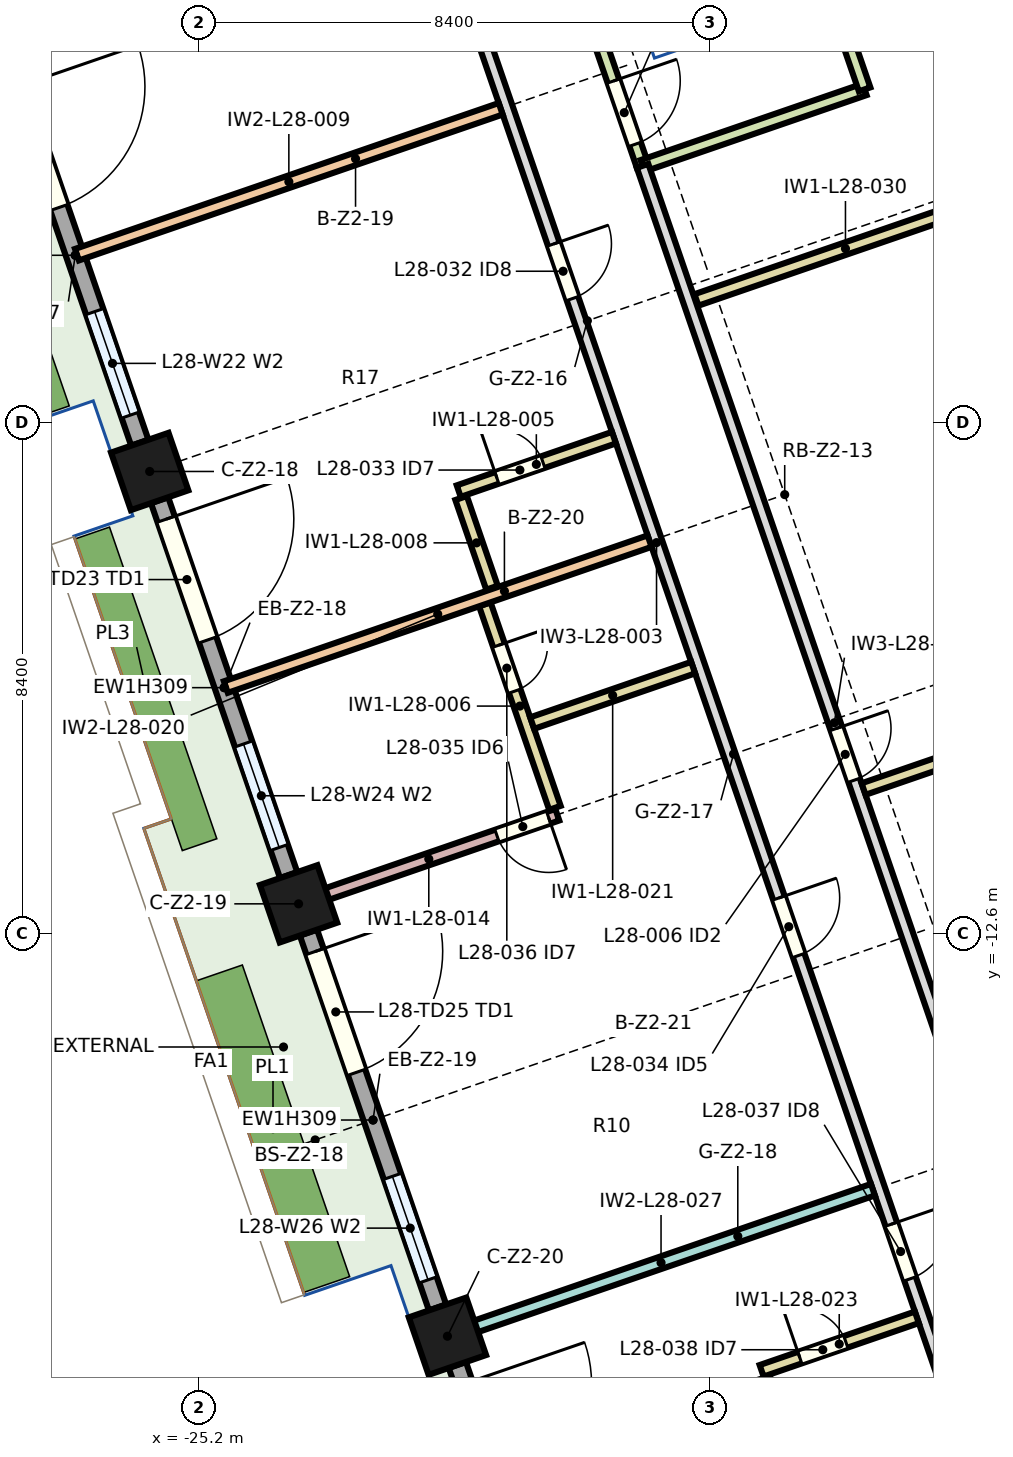
"""IFC4 building model, lengths in metres.
Left out: names, types, materials, properties, quantities, classifications, styles, units other than length and angle.
Written with IfcOpenShell. Run it as: python <this file> out.ifc"""

import sys

from ifc_helpers import new_model, si_unit, direction, frame, frame_2d, origin, origin_2d, place, context, subcontext, project, spatial, rectangle, extrude, element, fill, save


model = new_model("IFC4")
c1 = context("Model", 3, precision=1e-05, world=origin(), true_north=direction((0.0, 1.0)))
c2 = subcontext(c1, "Body", "Model", "MODEL_VIEW")
j1 = project(units=[si_unit("LENGTHUNIT", "METRE"), si_unit("PLANEANGLEUNIT", "RADIAN")], contexts=[c1])
p1 = place(None, origin())
s1 = spatial("IfcSite", under=j1, at=p1, CompositionType="ELEMENT")
p2 = place(p1, origin())
s2 = spatial("IfcBuilding", under=s1, at=p2, CompositionType="ELEMENT")
p3 = place(p2, frame((0.0, 0.0, 134.5)))
s3 = spatial("IfcBuildingStorey", under=s2, at=p3, CompositionType="ELEMENT", Elevation=134.5)
for number, where, z_axis, x_axis in (
    (1, (-25.997, -4.975, 0.0), (0.0, 0.0, 1.0), (0.946, 0.326, 0.0)),
    (2, (-23.548, -12.085, 0.0), (0.0, 0.0, 1.0), (0.946, 0.326, 0.0)),
    (3, (-21.1, -19.195, 0.0), (0.0, 0.0, 1.0), (0.946, 0.326, 0.0)),
):
    element("IfcColumn", number, at=place(p3, frame(where, z_axis=z_axis, x_axis=x_axis)), inside=s3, PredefinedType="COLUMN", context=c2, shape_type="SweptSolid", body=[
        extrude(rectangle(XDim=1.0, YDim=1.0, at=origin_2d()), origin(), (0.0, 0.0, 1.0), 3.55),
    ])
p4 = place(p3, frame((-28.282, 1.663, 0.0), z_axis=(0.0, 0.0, 1.0), x_axis=(0.325580990241, -0.945514155787, 0.0)))
e4 = element("IfcWall", 4, at=p4, inside=s3, PredefinedType="SOLIDWALL", context=c2, shape_type="SweptSolid", body=[
    extrude(rectangle(XDim=6.52, YDim=0.3, at=frame_2d((3.26, 0.0))), origin(), (0.0, 0.0, 1.0), 3.09),
])
p5 = place(p4, frame((0.33, 0.0, 0.0)))
e5 = element("IfcOpeningElement", 5, at=p5, cuts=e4, PredefinedType="OPENING", context=c2, shape_type="SweptSolid", body=[
    extrude(rectangle(XDim=2.1, YDim=2.4, at=frame_2d((1.05, 1.2))), frame((0.0, 0.16, 0.0), z_axis=(0.0, -1.0, 0.0), x_axis=(1.0, 0.0, 0.0)), (0.0, 0.0, 1.0), 0.32),
])
p6 = place(p4, frame((4.24, 0.0, 0.9)))
e6 = element("IfcOpeningElement", 6, at=p6, cuts=e4, PredefinedType="OPENING", context=c2, shape_type="SweptSolid", body=[
    extrude(rectangle(XDim=1.8, YDim=1.5, at=frame_2d((0.9, 0.75))), frame((0.0, 0.16, 0.0), z_axis=(0.0, -1.0, 0.0), x_axis=(1.0, 0.0, 0.0)), (0.0, 0.0, 1.0), 0.32),
])
p7 = place(p3, frame((-25.834, -5.448, 0.0), z_axis=(0.0, 0.0, 1.0), x_axis=(0.325580990241, -0.945514155787, 0.0)))
e7 = element("IfcWall", 7, at=p7, inside=s3, PredefinedType="SOLIDWALL", context=c2, shape_type="SweptSolid", body=[
    extrude(rectangle(XDim=6.52, YDim=0.3, at=frame_2d((3.26, 0.0))), origin(), (0.0, 0.0, 1.0), 3.09),
])
p8 = place(p7, frame((0.33, 0.0, 0.0)))
e8 = element("IfcOpeningElement", 8, at=p8, cuts=e7, PredefinedType="OPENING", context=c2, shape_type="SweptSolid", body=[
    extrude(rectangle(XDim=2.1, YDim=2.4, at=frame_2d((1.05, 1.2))), frame((0.0, 0.16, 0.0), z_axis=(0.0, -1.0, 0.0), x_axis=(1.0, 0.0, 0.0)), (0.0, 0.0, 1.0), 0.32),
])
p9 = place(p7, frame((4.24, 0.0, 0.9)))
e9 = element("IfcOpeningElement", 9, at=p9, cuts=e7, PredefinedType="OPENING", context=c2, shape_type="SweptSolid", body=[
    extrude(rectangle(XDim=1.8, YDim=1.5, at=frame_2d((0.9, 0.75))), frame((0.0, 0.16, 0.0), z_axis=(0.0, -1.0, 0.0), x_axis=(1.0, 0.0, 0.0)), (0.0, 0.0, 1.0), 0.32),
])
p10 = place(p3, frame((-23.386, -12.558, 0.0), z_axis=(0.0, 0.0, 1.0), x_axis=(0.325580990241, -0.945514155787, 0.0)))
e10 = element("IfcWall", 10, at=p10, inside=s3, PredefinedType="SOLIDWALL", context=c2, shape_type="SweptSolid", body=[
    extrude(rectangle(XDim=6.52, YDim=0.3, at=frame_2d((3.26, 0.0))), origin(), (0.0, 0.0, 1.0), 3.09),
])
p11 = place(p10, frame((0.33, 0.0, 0.0)))
e11 = element("IfcOpeningElement", 11, at=p11, cuts=e10, PredefinedType="OPENING", context=c2, shape_type="SweptSolid", body=[
    extrude(rectangle(XDim=2.1, YDim=2.4, at=frame_2d((1.05, 1.2))), frame((0.0, 0.16, 0.0), z_axis=(0.0, -1.0, 0.0), x_axis=(1.0, 0.0, 0.0)), (0.0, 0.0, 1.0), 0.32),
])
p12 = place(p10, frame((4.24, 0.0, 0.9)))
e12 = element("IfcOpeningElement", 12, at=p12, cuts=e10, PredefinedType="OPENING", context=c2, shape_type="SweptSolid", body=[
    extrude(rectangle(XDim=1.8, YDim=1.5, at=frame_2d((0.9, 0.75))), frame((0.0, 0.16, 0.0), z_axis=(0.0, -1.0, 0.0), x_axis=(1.0, 0.0, 0.0)), (0.0, 0.0, 1.0), 0.32),
])
p13 = place(p3, frame((-20.938, -19.668, 0.0), z_axis=(0.0, 0.0, 1.0), x_axis=(0.325592517631, -0.945510186335, 0.0)))
e13 = element("IfcWall", 13, at=p13, inside=s3, PredefinedType="SOLIDWALL", context=c2, shape_type="SweptSolid", body=[
    extrude(rectangle(XDim=6.52, YDim=0.3, at=frame_2d((3.26, 0.0))), origin(), (0.0, 0.0, 1.0), 3.09),
])
p14 = place(p13, frame((0.33, 0.0, 0.0)))
e14 = element("IfcOpeningElement", 14, at=p14, cuts=e13, PredefinedType="OPENING", context=c2, shape_type="SweptSolid", body=[
    extrude(rectangle(XDim=2.1, YDim=2.4, at=frame_2d((1.05, 1.2))), frame((0.0, 0.16, 0.0), z_axis=(0.0, -1.0, 0.0), x_axis=(1.0, 0.0, 0.0)), (0.0, 0.0, 1.0), 0.32),
])
p15 = place(p13, frame((4.24, 0.0, 0.9)))
e15 = element("IfcOpeningElement", 15, at=p15, cuts=e13, PredefinedType="OPENING", context=c2, shape_type="SweptSolid", body=[
    extrude(rectangle(XDim=1.8, YDim=1.5, at=frame_2d((0.9, 0.75))), frame((0.0, 0.16, 0.0), z_axis=(0.0, -1.0, 0.0), x_axis=(1.0, 0.0, 0.0)), (0.0, 0.0, 1.0), 0.32),
])
p16 = place(p3, frame((-22.623, 8.265, 0.0), z_axis=(0.0, 0.0, 1.0), x_axis=(0.325567058058, -0.945518953119, 0.0)))
e16 = element("IfcWall", 16, at=p16, inside=s3, PredefinedType="PARTITIONING", context=c2, shape_type="SweptSolid", body=[
    extrude(rectangle(XDim=30.48, YDim=0.2, at=frame_2d((15.24, 0.0))), origin(), (0.0, 0.0, 1.0), 3.55),
])
p17 = place(p16, frame((4.195, 0.0, 0.0)))
e17 = element("IfcOpeningElement", 17, at=p17, cuts=e16, PredefinedType="OPENING", context=c2, shape_type="SweptSolid", body=[
    extrude(rectangle(XDim=0.95, YDim=2.1, at=frame_2d((0.475, 1.05))), frame((0.0, 0.11, 0.0), z_axis=(0.0, -1.0, 0.0), x_axis=(1.0, 0.0, 0.0)), (0.0, 0.0, 1.0), 0.22),
])
p18 = place(p16, frame((10.045, 0.0, 0.0)))
e18 = element("IfcOpeningElement", 18, at=p18, cuts=e16, PredefinedType="OPENING", context=c2, shape_type="SweptSolid", body=[
    extrude(rectangle(XDim=0.95, YDim=2.1, at=frame_2d((0.475, 1.05))), frame((0.0, 0.11, 0.0), z_axis=(0.0, -1.0, 0.0), x_axis=(1.0, 0.0, 0.0)), (0.0, 0.0, 1.0), 0.22),
])
p19 = place(p16, frame((21.42, 0.0, 0.0)))
e19 = element("IfcOpeningElement", 19, at=p19, cuts=e16, PredefinedType="OPENING", context=c2, shape_type="SweptSolid", body=[
    extrude(rectangle(XDim=1.0, YDim=2.1, at=frame_2d((0.5, 1.05))), frame((0.0, 0.11, 0.0), z_axis=(0.0, -1.0, 0.0), x_axis=(1.0, 0.0, 0.0)), (0.0, 0.0, 1.0), 0.22),
])
p20 = place(p16, frame((27.095, 0.0, 0.0)))
e20 = element("IfcOpeningElement", 20, at=p20, cuts=e16, PredefinedType="OPENING", context=c2, shape_type="SweptSolid", body=[
    extrude(rectangle(XDim=0.95, YDim=2.1, at=frame_2d((0.475, 1.05))), frame((0.0, 0.11, 0.0), z_axis=(0.0, -1.0, 0.0), x_axis=(1.0, 0.0, 0.0)), (0.0, 0.0, 1.0), 0.22),
])
p21 = place(p3, frame((-20.915, -5.298, 0.0), z_axis=(0.0, 0.0, 1.0), x_axis=(0.945508383903, 0.325597751787, 0.0)))
e21 = element("IfcWall", 21, at=p21, inside=s3, PredefinedType="PARTITIONING", context=c2, shape_type="SweptSolid", body=[
    extrude(rectangle(XDim=2.7, YDim=0.2, at=frame_2d((1.35, 0.0))), origin(), (0.0, 0.0, 1.0), 3.55),
])
p22 = place(p21, frame((0.664, 0.0, 0.0)))
e22 = element("IfcOpeningElement", 22, at=p22, cuts=e21, PredefinedType="OPENING", context=c2, shape_type="SweptSolid", body=[
    extrude(rectangle(XDim=0.8, YDim=2.1, at=frame_2d((0.4, 1.05))), frame((0.0, 0.11, 0.0), z_axis=(0.0, -1.0, 0.0), x_axis=(1.0, 0.0, 0.0)), (0.0, 0.0, 1.0), 0.22),
])
p23 = place(p3, frame((-20.485, -7.159, 0.0), z_axis=(0.0, 0.0, 1.0), x_axis=(0.325523047431, -0.945534105991, 0.0)))
e23 = element("IfcWall", 23, at=p23, inside=s3, PredefinedType="PARTITIONING", context=c2, shape_type="SweptSolid", body=[
    extrude(rectangle(XDim=3.54, YDim=0.2, at=frame_2d((1.77, 0.0))), origin(), (0.0, 0.0, 1.0), 3.55),
])
p24 = place(p23, frame((0.71, 0.0, 0.0)))
e24 = element("IfcOpeningElement", 24, at=p24, cuts=e23, PredefinedType="OPENING", context=c2, shape_type="SweptSolid", body=[
    extrude(rectangle(XDim=0.8, YDim=2.1, at=frame_2d((0.4, 1.05))), frame((0.0, 0.11, 0.0), z_axis=(0.0, -1.0, 0.0), x_axis=(1.0, 0.0, 0.0)), (0.0, 0.0, 1.0), 0.22),
])
p25 = place(p3, frame((-20.368, -6.886, 0.0), z_axis=(0.0, 0.0, 1.0), x_axis=(-0.325508352099, 0.945539165087, 0.0)))
e25 = element("IfcWall", 25, at=p25, inside=s3, PredefinedType="PARTITIONING", context=c2, shape_type="SweptSolid", body=[
    extrude(rectangle(XDim=1.56, YDim=0.2, at=frame_2d((0.78, 0.0))), origin(), (0.0, 0.0, 1.0), 3.55),
])
p26 = place(p3, frame((-20.224, 0.99, 0.0), z_axis=(0.0, 0.0, 1.0), x_axis=(-0.945516523202, -0.32557411499, 0.0)))
e26 = element("IfcWall", 26, at=p26, inside=s3, PredefinedType="PARTITIONING", context=c2, shape_type="SweptSolid", body=[
    extrude(rectangle(XDim=7.37, YDim=0.2, at=frame_2d((3.685, 0.0))), origin(), (0.0, 0.0, 1.0), 3.05),
])
p27 = place(p3, frame((-19.845, 5.724, 0.0), z_axis=(0.0, 0.0, 1.0), x_axis=(0.325563034341, -0.945520338581, 0.0)))
e27 = element("IfcWall", 27, at=p27, inside=s3, PredefinedType="SOLIDWALL", context=c2, shape_type="SweptSolid", body=[
    extrude(rectangle(XDim=6.0, YDim=0.2, at=frame_2d((3.0, 0.0))), origin(), (0.0, 0.0, 1.0), 3.55),
])
p28 = place(p27, frame((4.525, 0.0, 0.0)))
e28 = element("IfcOpeningElement", 28, at=p28, cuts=e27, PredefinedType="OPENING", context=c2, shape_type="SweptSolid", body=[
    extrude(rectangle(XDim=1.1, YDim=2.1, at=frame_2d((0.55, 1.05))), frame((0.0, 0.11, 0.0), z_axis=(0.0, -1.0, 0.0), x_axis=(1.0, 0.0, 0.0)), (0.0, 0.0, 1.0), 0.22),
])
p29 = place(p3, frame((-19.294, -10.62, 0.0), z_axis=(0.0, 0.0, 1.0), x_axis=(-0.945529593347, -0.325536154835, 0.0)))
e29 = element("IfcWall", 29, at=p29, inside=s3, PredefinedType="PARTITIONING", context=c2, shape_type="SweptSolid", body=[
    extrude(rectangle(XDim=4.47, YDim=0.2, at=frame_2d((2.235, 0.0))), origin(), (0.0, 0.0, 1.0), 2.65),
])
p30 = place(p29, frame((0.15, 0.0, 0.0)))
e30 = element("IfcOpeningElement", 30, at=p30, cuts=e29, PredefinedType="OPENING", context=c2, shape_type="SweptSolid", body=[
    extrude(rectangle(XDim=0.9, YDim=2.1, at=frame_2d((0.45, 1.05))), frame((0.0, 0.11, 0.0), z_axis=(0.0, -1.0, 0.0), x_axis=(1.0, 0.0, 0.0)), (0.0, 0.0, 1.0), 0.22),
])
p31 = place(p3, frame((-17.892, 0.051, 0.0), z_axis=(0.0, 0.0, 1.0), x_axis=(0.945514621213, 0.325579638603, 0.0)))
e31 = element("IfcWall", 31, at=p31, inside=s3, PredefinedType="SOLIDWALL", context=c2, shape_type="SweptSolid", body=[
    extrude(rectangle(XDim=3.863, YDim=0.2, at=frame_2d((1.931, 0.0))), origin(), (0.0, 0.0, 1.0), 3.55),
])
p32 = place(p3, frame((-17.892, 0.051, 0.0), z_axis=(0.0, 0.0, 1.0), x_axis=(0.325580537834, -0.94551431157, 0.0)))
e32 = element("IfcWall", 32, at=p32, inside=s3, PredefinedType="PARTITIONING", context=c2, shape_type="SweptSolid", body=[
    extrude(rectangle(XDim=19.374, YDim=0.2, at=frame_2d((9.687, 0.0))), origin(), (0.0, 0.0, 1.0), 3.55),
])
p33 = place(p32, frame((9.786, 0.0, 0.0)))
e33 = element("IfcOpeningElement", 33, at=p33, cuts=e32, PredefinedType="OPENING", context=c2, shape_type="SweptSolid", body=[
    extrude(rectangle(XDim=0.9, YDim=2.1, at=frame_2d((0.45, 1.05))), frame((0.0, 0.11, 0.0), z_axis=(0.0, -1.0, 0.0), x_axis=(1.0, 0.0, 0.0)), (0.0, 0.0, 1.0), 0.22),
])
p34 = place(p3, frame((-17.776, -6.121, 0.0), z_axis=(0.0, 0.0, 1.0), x_axis=(-0.945520034471, -0.325563917555, 0.0)))
e34 = element("IfcWall", 34, at=p34, inside=s3, PredefinedType="PARTITIONING", context=c2, shape_type="SweptSolid", body=[
    extrude(rectangle(XDim=7.37, YDim=0.2, at=frame_2d((3.685, 0.0))), origin(), (0.0, 0.0, 1.0), 3.05),
])
p35 = place(p3, frame((-17.06, -8.201, 0.0), z_axis=(0.0, 0.0, 1.0), x_axis=(-0.945515586558, -0.325576835135, 0.0)))
e35 = element("IfcWall", 35, at=p35, inside=s3, PredefinedType="PARTITIONING", context=c2, shape_type="SweptSolid", body=[
    extrude(rectangle(XDim=2.8, YDim=0.2, at=frame_2d((1.4, 0.0))), origin(), (0.0, 0.0, 1.0), 3.55),
])
p36 = place(p3, frame((-15.934, -19.764, 0.0), z_axis=(0.0, 0.0, 1.0), x_axis=(0.945536217154, 0.325516915153, 0.0)))
e36 = element("IfcWall", 36, at=p36, inside=s3, PredefinedType="PARTITIONING", context=c2, shape_type="SweptSolid", body=[
    extrude(rectangle(XDim=2.7, YDim=0.2, at=frame_2d((1.35, 0.0))), origin(), (0.0, 0.0, 1.0), 3.55),
])
p37 = place(p36, frame((0.664, 0.0, 0.0)))
e37 = element("IfcOpeningElement", 37, at=p37, cuts=e36, PredefinedType="OPENING", context=c2, shape_type="SweptSolid", body=[
    extrude(rectangle(XDim=0.8, YDim=2.1, at=frame_2d((0.4, 1.05))), frame((0.0, 0.11, 0.0), z_axis=(0.0, -1.0, 0.0), x_axis=(1.0, 0.0, 0.0)), (0.0, 0.0, 1.0), 0.22),
])
p38 = place(p3, frame((-15.386, -21.353, 0.0), z_axis=(0.0, 0.0, 1.0), x_axis=(-0.325508352099, 0.945539165087, 0.0)))
e38 = element("IfcWall", 38, at=p38, inside=s3, PredefinedType="PARTITIONING", context=c2, shape_type="SweptSolid", body=[
    extrude(rectangle(XDim=1.56, YDim=0.2, at=frame_2d((0.78, 0.0))), origin(), (0.0, 0.0, 1.0), 3.55),
])
p39 = place(p3, frame((-14.24, 1.309, 0.0), z_axis=(0.0, 0.0, 1.0), x_axis=(-0.325599106316, 0.945507917453, 0.0)))
e39 = element("IfcWall", 39, at=p39, inside=s3, PredefinedType="SOLIDWALL", context=c2, shape_type="SweptSolid", body=[
    extrude(rectangle(XDim=4.9, YDim=0.2, at=frame_2d((2.45, 0.0))), origin(), (0.0, 0.0, 1.0), 3.55),
])
p40 = place(p3, frame((-14.103, -16.786, 0.0), z_axis=(0.0, 0.0, 1.0), x_axis=(-0.945520034471, -0.325563917555, 0.0)))
e40 = element("IfcWall", 40, at=p40, inside=s3, PredefinedType="PARTITIONING", context=c2, shape_type="SweptSolid", body=[
    extrude(rectangle(XDim=7.37, YDim=0.2, at=frame_2d((3.685, 0.0))), origin(), (0.0, 0.0, 1.0), 2.65),
])
p41 = place(p3, frame((-12.104, -0.466, 0.0), z_axis=(0.0, 0.0, 1.0), x_axis=(-0.945514533015, -0.325579894737, 0.0)))
e41 = element("IfcWall", 41, at=p41, inside=s3, PredefinedType="PARTITIONING", context=c2, shape_type="SweptSolid", body=[
    extrude(rectangle(XDim=5.184, YDim=0.2, at=frame_2d((2.592, 0.0))), origin(), (0.0, 0.0, 1.0), 3.55),
])
p42 = place(p3, frame((-9.112, -8.426, 0.0), z_axis=(0.0, 0.0, 1.0), x_axis=(-0.945518793757, -0.32556752088, 0.0)))
e42 = element("IfcWall", 42, at=p42, inside=s3, PredefinedType="PARTITIONING", context=c2, shape_type="SweptSolid", body=[
    extrude(rectangle(XDim=5.441, YDim=0.2, at=frame_2d((2.721, 0.0))), origin(), (0.0, 0.0, 1.0), 3.55),
])
p43 = place(p5, origin())
e43 = element("IfcDoor", 43, at=p43, inside=s3, OperationType="SLIDING_TO_LEFT", PredefinedType="DOOR", context=c2, shape_type="SweptSolid", body=[
    extrude(rectangle(XDim=2.1, YDim=2.4, at=frame_2d((1.05, 1.2))), frame((0.0, 0.025, 0.0), z_axis=(0.0, -1.0, 0.0), x_axis=(1.0, 0.0, 0.0)), (0.0, 0.0, 1.0), 0.05),
])
fill(e5, e43)
p44 = place(p6, origin())
e44 = element("IfcWindow", 44, at=p44, inside=s3, PartitioningType="SINGLE_PANEL", PredefinedType="WINDOW", context=c2, shape_type="SweptSolid", body=[
    extrude(rectangle(XDim=1.8, YDim=1.5, at=frame_2d((0.9, 0.75))), frame((0.0, 0.03, 0.0), z_axis=(0.0, -1.0, 0.0), x_axis=(1.0, 0.0, 0.0)), (0.0, 0.0, 1.0), 0.06),
])
fill(e6, e44)
p45 = place(p8, origin())
e45 = element("IfcDoor", 45, at=p45, inside=s3, OperationType="SLIDING_TO_LEFT", PredefinedType="DOOR", context=c2, shape_type="SweptSolid", body=[
    extrude(rectangle(XDim=2.1, YDim=2.4, at=frame_2d((1.05, 1.2))), frame((0.0, 0.025, 0.0), z_axis=(0.0, -1.0, 0.0), x_axis=(1.0, 0.0, 0.0)), (0.0, 0.0, 1.0), 0.05),
])
fill(e8, e45)
p46 = place(p9, origin())
e46 = element("IfcWindow", 46, at=p46, inside=s3, PartitioningType="SINGLE_PANEL", PredefinedType="WINDOW", context=c2, shape_type="SweptSolid", body=[
    extrude(rectangle(XDim=1.8, YDim=1.5, at=frame_2d((0.9, 0.75))), frame((0.0, 0.03, 0.0), z_axis=(0.0, -1.0, 0.0), x_axis=(1.0, 0.0, 0.0)), (0.0, 0.0, 1.0), 0.06),
])
fill(e9, e46)
p47 = place(p11, origin())
e47 = element("IfcDoor", 47, at=p47, inside=s3, OperationType="SLIDING_TO_LEFT", PredefinedType="DOOR", context=c2, shape_type="SweptSolid", body=[
    extrude(rectangle(XDim=2.1, YDim=2.4, at=frame_2d((1.05, 1.2))), frame((0.0, 0.025, 0.0), z_axis=(0.0, -1.0, 0.0), x_axis=(1.0, 0.0, 0.0)), (0.0, 0.0, 1.0), 0.05),
])
fill(e11, e47)
p48 = place(p12, origin())
e48 = element("IfcWindow", 48, at=p48, inside=s3, PartitioningType="SINGLE_PANEL", PredefinedType="WINDOW", context=c2, shape_type="SweptSolid", body=[
    extrude(rectangle(XDim=1.8, YDim=1.5, at=frame_2d((0.9, 0.75))), frame((0.0, 0.03, 0.0), z_axis=(0.0, -1.0, 0.0), x_axis=(1.0, 0.0, 0.0)), (0.0, 0.0, 1.0), 0.06),
])
fill(e12, e48)
p49 = place(p28, origin())
e49 = element("IfcDoor", 49, at=p49, inside=s3, OperationType="NOTDEFINED", PredefinedType="DOOR", context=c2, shape_type="SweptSolid", body=[
    extrude(rectangle(XDim=1.1, YDim=2.1, at=frame_2d((0.55, 1.05))), frame((0.0, 0.025, 0.0), z_axis=(0.0, -1.0, 0.0), x_axis=(1.0, 0.0, 0.0)), (0.0, 0.0, 1.0), 0.05),
])
fill(e28, e49)
p50 = place(p33, origin())
e50 = element("IfcDoor", 50, at=p50, inside=s3, OperationType="NOTDEFINED", PredefinedType="DOOR", context=c2, shape_type="SweptSolid", body=[
    extrude(rectangle(XDim=0.9, YDim=2.1, at=frame_2d((0.45, 1.05))), frame((0.0, 0.025, 0.0), z_axis=(0.0, -1.0, 0.0), x_axis=(1.0, 0.0, 0.0)), (0.0, 0.0, 1.0), 0.05),
])
fill(e33, e50)
p51 = place(p18, origin())
e51 = element("IfcDoor", 51, at=p51, inside=s3, OperationType="NOTDEFINED", PredefinedType="DOOR", context=c2, shape_type="SweptSolid", body=[
    extrude(rectangle(XDim=0.95, YDim=2.1, at=frame_2d((0.475, 1.05))), frame((0.0, 0.025, 0.0), z_axis=(0.0, -1.0, 0.0), x_axis=(1.0, 0.0, 0.0)), (0.0, 0.0, 1.0), 0.05),
])
fill(e18, e51)
p52 = place(p22, origin())
e52 = element("IfcDoor", 52, at=p52, inside=s3, OperationType="NOTDEFINED", PredefinedType="DOOR", context=c2, shape_type="SweptSolid", body=[
    extrude(rectangle(XDim=0.8, YDim=2.1, at=frame_2d((0.4, 1.05))), frame((0.0, 0.025, 0.0), z_axis=(0.0, -1.0, 0.0), x_axis=(1.0, 0.0, 0.0)), (0.0, 0.0, 1.0), 0.05),
])
fill(e22, e52)
p53 = place(p19, origin())
e53 = element("IfcDoor", 53, at=p53, inside=s3, OperationType="NOTDEFINED", PredefinedType="DOOR", context=c2, shape_type="SweptSolid", body=[
    extrude(rectangle(XDim=1.0, YDim=2.1, at=frame_2d((0.5, 1.05))), frame((0.0, 0.025, 0.0), z_axis=(0.0, -1.0, 0.0), x_axis=(1.0, 0.0, 0.0)), (0.0, 0.0, 1.0), 0.05),
])
fill(e19, e53)
p54 = place(p30, origin())
e54 = element("IfcDoor", 54, at=p54, inside=s3, OperationType="NOTDEFINED", PredefinedType="DOOR", context=c2, shape_type="SweptSolid", body=[
    extrude(rectangle(XDim=0.9, YDim=2.1, at=frame_2d((0.45, 1.05))), frame((0.0, 0.025, 0.0), z_axis=(0.0, -1.0, 0.0), x_axis=(1.0, 0.0, 0.0)), (0.0, 0.0, 1.0), 0.05),
])
fill(e30, e54)
p55 = place(p24, origin())
e55 = element("IfcDoor", 55, at=p55, inside=s3, OperationType="NOTDEFINED", PredefinedType="DOOR", context=c2, shape_type="SweptSolid", body=[
    extrude(rectangle(XDim=0.8, YDim=2.1, at=frame_2d((0.4, 1.05))), frame((0.0, 0.025, 0.0), z_axis=(0.0, -1.0, 0.0), x_axis=(1.0, 0.0, 0.0)), (0.0, 0.0, 1.0), 0.05),
])
fill(e24, e55)
p56 = place(p20, origin())
e56 = element("IfcDoor", 56, at=p56, inside=s3, OperationType="NOTDEFINED", PredefinedType="DOOR", context=c2, shape_type="SweptSolid", body=[
    extrude(rectangle(XDim=0.95, YDim=2.1, at=frame_2d((0.475, 1.05))), frame((0.0, 0.025, 0.0), z_axis=(0.0, -1.0, 0.0), x_axis=(1.0, 0.0, 0.0)), (0.0, 0.0, 1.0), 0.05),
])
fill(e20, e56)
p57 = place(p37, origin())
e57 = element("IfcDoor", 57, at=p57, inside=s3, OperationType="NOTDEFINED", PredefinedType="DOOR", context=c2, shape_type="SweptSolid", body=[
    extrude(rectangle(XDim=0.8, YDim=2.1, at=frame_2d((0.4, 1.05))), frame((0.0, 0.025, 0.0), z_axis=(0.0, -1.0, 0.0), x_axis=(1.0, 0.0, 0.0)), (0.0, 0.0, 1.0), 0.05),
])
fill(e37, e57)
save(model, sys.argv[1])
